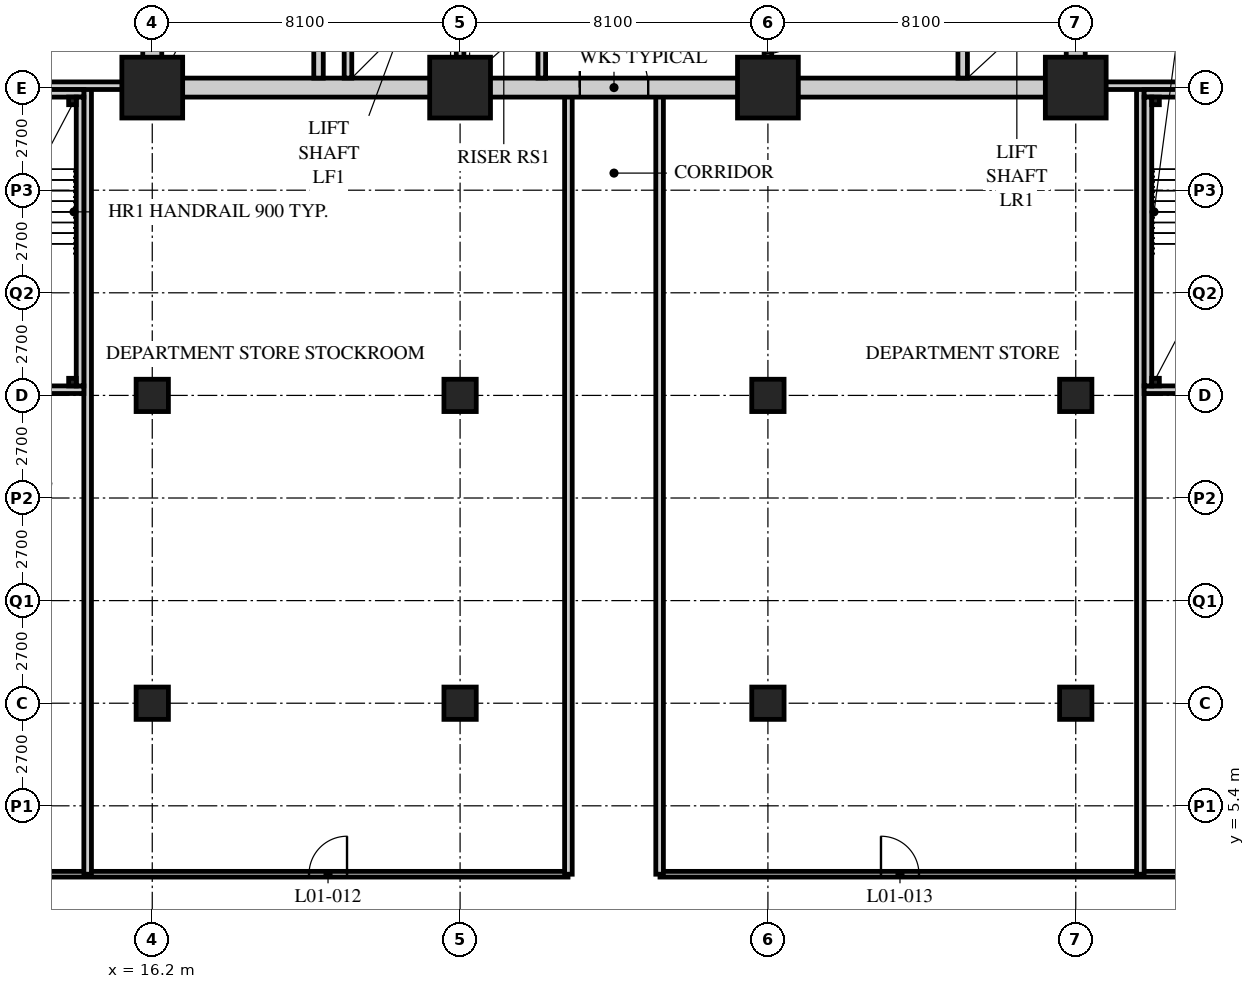
"""IFC4 building model, lengths in metres.
Left out: names, types, materials, properties, quantities, classifications, styles, units other than length and angle.
Written with IfcOpenShell. Run it as: python <this file> out.ifc"""

import sys

from ifc_helpers import new_model, si_unit, direction, frame, frame_2d, origin, origin_2d, place, context, subcontext, project, spatial, rectangle, hollow_rectangle, extrude, element, fill, save


model = new_model("IFC4")
c1 = context("Model", 3, precision=1e-05, world=origin(), true_north=direction((0.0, 1.0)))
c2 = subcontext(c1, "Body", "Model", "MODEL_VIEW")
j1 = project(units=[si_unit("LENGTHUNIT", "METRE"), si_unit("PLANEANGLEUNIT", "RADIAN")], contexts=[c1])
p1 = place(None, origin())
s1 = spatial("IfcSite", under=j1, at=p1, CompositionType="ELEMENT")
p2 = place(p1, origin())
s2 = spatial("IfcBuilding", under=s1, at=p2, CompositionType="ELEMENT")
p3 = place(p2, frame((0.0, 0.0, 6.0)))
s3 = spatial("IfcBuildingStorey", under=s2, at=p3, CompositionType="ELEMENT", Elevation=6.0)
for number, where, z_axis, x_axis in (
    (1, (16.2, 8.1, 0.0), (0.0, 0.0, 1.0), (1.0, 0.0, 0.0)),
    (2, (16.2, 16.2, 0.0), (0.0, 0.0, 1.0), (1.0, 0.0, 0.0)),
):
    element("IfcColumn", number, at=place(p3, frame(where, z_axis=z_axis, x_axis=x_axis)), inside=s3, PredefinedType="COLUMN", context=c2, shape_type="SweptSolid", body=[
        extrude(hollow_rectangle(XDim=0.85, YDim=0.85, WallThickness=0.085, at=origin_2d()), origin(), (0.0, 0.0, 1.0), 5.4),
    ])
p4 = place(p3, frame((16.2, 24.3, 0.0), z_axis=(0.0, 0.0, 1.0), x_axis=(1.0, 0.0, 0.0)))
e3 = element("IfcColumn", 3, at=p4, inside=s3, PredefinedType="COLUMN", context=c2, shape_type="SweptSolid", body=[
    extrude(hollow_rectangle(XDim=1.6, YDim=1.6, WallThickness=0.15, at=origin_2d()), origin(), (0.0, 0.0, 1.0), 5.4),
])
for number, where, z_axis, x_axis in (
    (4, (24.3, 8.1, 0.0), (0.0, 0.0, 1.0), (1.0, 0.0, 0.0)),
    (5, (24.3, 16.2, 0.0), (0.0, 0.0, 1.0), (1.0, 0.0, 0.0)),
):
    element("IfcColumn", number, at=place(p3, frame(where, z_axis=z_axis, x_axis=x_axis)), inside=s3, PredefinedType="COLUMN", context=c2, shape_type="SweptSolid", body=[
        extrude(hollow_rectangle(XDim=0.85, YDim=0.85, WallThickness=0.085, at=origin_2d()), origin(), (0.0, 0.0, 1.0), 5.4),
    ])
p5 = place(p3, frame((24.3, 24.3, 0.0), z_axis=(0.0, 0.0, 1.0), x_axis=(1.0, 0.0, 0.0)))
e6 = element("IfcColumn", 6, at=p5, inside=s3, PredefinedType="COLUMN", context=c2, shape_type="SweptSolid", body=[
    extrude(hollow_rectangle(XDim=1.6, YDim=1.6, WallThickness=0.15, at=origin_2d()), origin(), (0.0, 0.0, 1.0), 5.4),
])
for number, where, z_axis, x_axis in (
    (7, (32.4, 8.1, 0.0), (0.0, 0.0, 1.0), (1.0, 0.0, 0.0)),
    (8, (32.4, 16.2, 0.0), (0.0, 0.0, 1.0), (1.0, 0.0, 0.0)),
):
    element("IfcColumn", number, at=place(p3, frame(where, z_axis=z_axis, x_axis=x_axis)), inside=s3, PredefinedType="COLUMN", context=c2, shape_type="SweptSolid", body=[
        extrude(hollow_rectangle(XDim=0.85, YDim=0.85, WallThickness=0.085, at=origin_2d()), origin(), (0.0, 0.0, 1.0), 5.4),
    ])
p6 = place(p3, frame((32.4, 24.3, 0.0), z_axis=(0.0, 0.0, 1.0), x_axis=(1.0, 0.0, 0.0)))
e9 = element("IfcColumn", 9, at=p6, inside=s3, PredefinedType="COLUMN", context=c2, shape_type="SweptSolid", body=[
    extrude(hollow_rectangle(XDim=1.6, YDim=1.6, WallThickness=0.15, at=origin_2d()), origin(), (0.0, 0.0, 1.0), 5.4),
])
for number, where, z_axis, x_axis in (
    (10, (40.5, 8.1, 0.0), (0.0, 0.0, 1.0), (1.0, 0.0, 0.0)),
    (11, (40.5, 16.2, 0.0), (0.0, 0.0, 1.0), (1.0, 0.0, 0.0)),
):
    element("IfcColumn", number, at=place(p3, frame(where, z_axis=z_axis, x_axis=x_axis)), inside=s3, PredefinedType="COLUMN", context=c2, shape_type="SweptSolid", body=[
        extrude(hollow_rectangle(XDim=0.85, YDim=0.85, WallThickness=0.085, at=origin_2d()), origin(), (0.0, 0.0, 1.0), 5.4),
    ])
p7 = place(p3, frame((40.5, 24.3, 0.0), z_axis=(0.0, 0.0, 1.0), x_axis=(1.0, 0.0, 0.0)))
e12 = element("IfcColumn", 12, at=p7, inside=s3, PredefinedType="COLUMN", context=c2, shape_type="SweptSolid", body=[
    extrude(hollow_rectangle(XDim=1.6, YDim=1.6, WallThickness=0.15, at=origin_2d()), origin(), (0.0, 0.0, 1.0), 5.4),
])
p8 = place(p3, frame((3.6, 3.6, 0.0), z_axis=(0.0, 0.0, 1.0), x_axis=(1.0, 0.0, 0.0)))
e13 = element("IfcWall", 13, at=p8, inside=s3, PredefinedType="PARTITIONING", context=c2, shape_type="SweptSolid", body=[
    extrude(rectangle(XDim=23.54, YDim=0.15, at=frame_2d((11.77, 0.0))), origin(), (0.0, 0.0, 1.0), 5.15),
])
p9 = place(p8, frame((2.65, 0.0, 0.0)))
e14 = element("IfcOpeningElement", 14, at=p9, cuts=e13, PredefinedType="OPENING", context=c2, shape_type="SweptSolid", body=[
    extrude(rectangle(XDim=1.0, YDim=2.1, at=frame_2d((0.5, 1.05))), frame((0.0, 0.085, 0.0), z_axis=(0.0, -1.0, 0.0), x_axis=(1.0, 0.0, 0.0)), (0.0, 0.0, 1.0), 0.17),
])
p10 = place(p8, frame((16.725, 0.0, 0.0)))
e15 = element("IfcOpeningElement", 15, at=p10, cuts=e13, PredefinedType="OPENING", context=c2, shape_type="SweptSolid", body=[
    extrude(rectangle(XDim=1.0, YDim=2.1, at=frame_2d((0.5, 1.05))), frame((0.0, 0.085, 0.0), z_axis=(0.0, -1.0, 0.0), x_axis=(1.0, 0.0, 0.0)), (0.0, 0.0, 1.0), 0.17),
])
p11 = place(p3, frame((29.56, 3.6, 0.0), z_axis=(0.0, 0.0, 1.0), x_axis=(1.0, 0.0, 0.0)))
e16 = element("IfcWall", 16, at=p11, inside=s3, PredefinedType="PARTITIONING", context=c2, shape_type="SweptSolid", body=[
    extrude(rectangle(XDim=23.54, YDim=0.15, at=frame_2d((11.77, 0.0))), origin(), (0.0, 0.0, 1.0), 5.15),
])
p12 = place(p11, frame((5.815, 0.0, 0.0)))
e17 = element("IfcOpeningElement", 17, at=p12, cuts=e16, PredefinedType="OPENING", context=c2, shape_type="SweptSolid", body=[
    extrude(rectangle(XDim=1.0, YDim=2.1, at=frame_2d((0.5, 1.05))), frame((0.0, 0.085, 0.0), z_axis=(0.0, -1.0, 0.0), x_axis=(1.0, 0.0, 0.0)), (0.0, 0.0, 1.0), 0.17),
])
p13 = place(p11, frame((19.89, 0.0, 0.0)))
e18 = element("IfcOpeningElement", 18, at=p13, cuts=e16, PredefinedType="OPENING", context=c2, shape_type="SweptSolid", body=[
    extrude(rectangle(XDim=1.0, YDim=2.1, at=frame_2d((0.5, 1.05))), frame((0.0, 0.085, 0.0), z_axis=(0.0, -1.0, 0.0), x_axis=(1.0, 0.0, 0.0)), (0.0, 0.0, 1.0), 0.17),
])
for number, where, z_axis, x_axis in (
    (19, (14.5, 3.6, 0.0), (0.0, 0.0, 1.0), (0.0, 1.0, 0.0)),
    (20, (42.2, 3.6, 0.0), (0.0, 0.0, 1.0), (0.0, 1.0, 0.0)),
    (21, (27.15, 3.6, 0.0), (0.0, 0.0, 1.0), (0.0, 1.0, 0.0)),
    (22, (29.55, 3.6, 0.0), (0.0, 0.0, 1.0), (0.0, 1.0, 0.0)),
):
    element("IfcWall", number, at=place(p3, frame(where, z_axis=z_axis, x_axis=x_axis)), inside=s3, PredefinedType="SOLIDWALL", context=c2, shape_type="SweptSolid", body=[
        extrude(rectangle(XDim=20.7, YDim=0.2, at=frame_2d((10.35, 0.0))), origin(), (0.0, 0.0, 1.0), 5.15),
    ])
p14 = place(p3, frame((3.6, 24.35, 0.0), z_axis=(0.0, 0.0, 1.0), x_axis=(1.0, 0.0, 0.0)))
e23 = element("IfcWall", 23, at=p14, inside=s3, PredefinedType="SOLIDWALL", context=c2, shape_type="SweptSolid", body=[
    extrude(rectangle(XDim=12.6, YDim=0.2, at=frame_2d((6.3, 0.0))), origin(), (0.0, 0.0, 1.0), 4.538),
])
p15 = place(p3, frame((40.5, 24.35, 0.0), z_axis=(0.0, 0.0, 1.0), x_axis=(1.0, 0.0, 0.0)))
e24 = element("IfcWall", 24, at=p15, inside=s3, PredefinedType="SOLIDWALL", context=c2, shape_type="SweptSolid", body=[
    extrude(rectangle(XDim=12.6, YDim=0.2, at=frame_2d((6.3, 0.0))), origin(), (0.0, 0.0, 1.0), 4.538),
])
p16 = place(p3, frame((15.95, 24.3, 0.0), z_axis=(0.0, 0.0, 1.0), x_axis=(1.0, 0.0, 0.0)))
e25 = element("IfcWall", 25, at=p16, inside=s3, PredefinedType="SOLIDWALL", context=c2, shape_type="SweptSolid", body=[
    extrude(rectangle(XDim=24.8, YDim=0.5, at=frame_2d((12.4, 0.0))), origin(), (0.0, 0.0, 1.0), 4.5),
])
p17 = place(p16, frame((11.5, 0.0, 0.0)))
e26 = element("IfcOpeningElement", 26, at=p17, cuts=e25, PredefinedType="OPENING", context=c2, shape_type="SweptSolid", body=[
    extrude(rectangle(XDim=1.8, YDim=2.4, at=frame_2d((0.9, 1.2))), frame((0.0, 0.26, 0.0), z_axis=(0.0, -1.0, 0.0), x_axis=(1.0, 0.0, 0.0)), (0.0, 0.0, 1.0), 0.52),
])
for number, where, z_axis, x_axis in (
    (27, (16.2, 24.55, 0.0), (0.0, 0.0, 1.0), (0.0, 1.0, 0.0)),
    (28, (40.5, 24.55, 0.0), (0.0, 0.0, 1.0), (0.0, 1.0, 0.0)),
):
    element("IfcWall", number, at=place(p3, frame(where, z_axis=z_axis, x_axis=x_axis)), inside=s3, PredefinedType="SOLIDWALL", context=c2, shape_type="SweptSolid", body=[
        extrude(rectangle(XDim=15.7, YDim=0.5, at=frame_2d((7.85, 0.0))), origin(), (0.0, 0.0, 1.0), 4.538),
    ])
p18 = place(p3, frame((24.3, 24.55, 0.0), z_axis=(0.0, 0.0, 1.0), x_axis=(0.0, 1.0, 0.0)))
e29 = element("IfcWall", 29, at=p18, inside=s3, PredefinedType="SOLIDWALL", context=c2, shape_type="SweptSolid", body=[
    extrude(rectangle(XDim=7.75, YDim=0.2, at=frame_2d((3.875, 0.0))), origin(), (0.0, 0.0, 1.0), 4.45),
])
p19 = place(p18, frame((4.6, 0.0, 0.0)))
e30 = element("IfcOpeningElement", 30, at=p19, cuts=e29, PredefinedType="OPENING", context=c2, shape_type="SweptSolid", body=[
    extrude(rectangle(XDim=1.2, YDim=2.1, at=frame_2d((0.6, 1.05))), frame((0.0, 0.11, 0.0), z_axis=(0.0, -1.0, 0.0), x_axis=(1.0, 0.0, 0.0)), (0.0, 0.0, 1.0), 0.22),
])
p20 = place(p3, frame((20.575, 24.55, 0.0), z_axis=(0.0, 0.0, 1.0), x_axis=(0.0, 1.0, 0.0)))
e31 = element("IfcWall", 31, at=p20, inside=s3, PredefinedType="SOLIDWALL", context=c2, shape_type="SweptSolid", body=[
    extrude(rectangle(XDim=7.75, YDim=0.25, at=frame_2d((3.875, 0.0))), origin(), (0.0, 0.0, 1.0), 5.15),
])
p21 = place(p20, frame((6.2, 0.0, 0.0)))
e32 = element("IfcOpeningElement", 32, at=p21, cuts=e31, PredefinedType="OPENING", context=c2, shape_type="SweptSolid", body=[
    extrude(rectangle(XDim=1.2, YDim=2.1, at=frame_2d((0.6, 1.05))), frame((0.0, 0.135, 0.0), z_axis=(0.0, -1.0, 0.0), x_axis=(1.0, 0.0, 0.0)), (0.0, 0.0, 1.0), 0.27),
])
p22 = place(p3, frame((21.35, 24.55, 0.0), z_axis=(0.0, 0.0, 1.0), x_axis=(0.0, 1.0, 0.0)))
e33 = element("IfcWall", 33, at=p22, inside=s3, PredefinedType="SOLIDWALL", context=c2, shape_type="SweptSolid", body=[
    extrude(rectangle(XDim=2.6, YDim=0.2, at=frame_2d((1.3, 0.0))), origin(), (0.0, 0.0, 1.0), 5.15),
])
p23 = place(p3, frame((26.45, 24.55, 0.0), z_axis=(0.0, 0.0, 1.0), x_axis=(0.0, 1.0, 0.0)))
e34 = element("IfcWall", 34, at=p23, inside=s3, PredefinedType="SOLIDWALL", context=c2, shape_type="SweptSolid", body=[
    extrude(rectangle(XDim=1.6, YDim=0.2, at=frame_2d((0.8, 0.0))), origin(), (0.0, 0.0, 1.0), 5.15),
])
p24 = place(p3, frame((37.525, 24.55, 0.0), z_axis=(0.0, 0.0, 1.0), x_axis=(0.0, 1.0, 0.0)))
e35 = element("IfcWall", 35, at=p24, inside=s3, PredefinedType="SOLIDWALL", context=c2, shape_type="SweptSolid", body=[
    extrude(rectangle(XDim=7.75, YDim=0.25, at=frame_2d((3.875, 0.0))), origin(), (0.0, 0.0, 1.0), 5.15),
])
p25 = place(p3, frame((32.4, 24.55, 0.0), z_axis=(0.0, 0.0, 1.0), x_axis=(0.0, 1.0, 0.0)))
e36 = element("IfcWall", 36, at=p25, inside=s3, PredefinedType="PARTITIONING", context=c2, shape_type="SweptSolid", body=[
    extrude(rectangle(XDim=7.75, YDim=0.2, at=frame_2d((3.875, 0.0))), origin(), (0.0, 0.0, 1.0), 4.45),
])
p26 = place(p25, frame((0.65, 0.0, 0.0)))
e37 = element("IfcOpeningElement", 37, at=p26, cuts=e36, PredefinedType="OPENING", context=c2, shape_type="SweptSolid", body=[
    extrude(rectangle(XDim=0.9, YDim=2.1, at=frame_2d((0.45, 1.05))), frame((0.0, 0.11, 0.0), z_axis=(0.0, -1.0, 0.0), x_axis=(1.0, 0.0, 0.0)), (0.0, 0.0, 1.0), 0.22),
])
p27 = place(p25, frame((4.5, 0.0, 0.0)))
e38 = element("IfcOpeningElement", 38, at=p27, cuts=e36, PredefinedType="OPENING", context=c2, shape_type="SweptSolid", body=[
    extrude(rectangle(XDim=0.9, YDim=2.1, at=frame_2d((0.45, 1.05))), frame((0.0, 0.11, 0.0), z_axis=(0.0, -1.0, 0.0), x_axis=(1.0, 0.0, 0.0)), (0.0, 0.0, 1.0), 0.22),
])
p28 = place(p3, frame((10.0, 16.35, 0.0), z_axis=(0.0, 0.0, 1.0), x_axis=(1.0, 0.0, 0.0)))
e39 = element("IfcWall", 39, at=p28, inside=s3, PredefinedType="SOLIDWALL", context=c2, shape_type="SweptSolid", body=[
    extrude(rectangle(XDim=4.4, YDim=0.2, at=frame_2d((2.2, 0.0))), origin(), (0.0, 0.0, 1.0), 4.538),
])
p29 = place(p28, frame((1.6, 0.0, 0.0)))
e40 = element("IfcOpeningElement", 40, at=p29, cuts=e39, PredefinedType="OPENING", context=c2, shape_type="SweptSolid", body=[
    extrude(rectangle(XDim=1.2, YDim=2.1, at=frame_2d((0.6, 1.05))), frame((0.0, 0.11, 0.0), z_axis=(0.0, -1.0, 0.0), x_axis=(1.0, 0.0, 0.0)), (0.0, 0.0, 1.0), 0.22),
])
p30 = place(p3, frame((10.0, 24.15, 0.0), z_axis=(0.0, 0.0, 1.0), x_axis=(1.0, 0.0, 0.0)))
e41 = element("IfcWall", 41, at=p30, inside=s3, PredefinedType="SOLIDWALL", context=c2, shape_type="SweptSolid", body=[
    extrude(rectangle(XDim=4.4, YDim=0.2, at=frame_2d((2.2, 0.0))), origin(), (0.0, 0.0, 1.0), 4.538),
])
p31 = place(p3, frame((14.3, 16.45, 0.0), z_axis=(0.0, 0.0, 1.0), x_axis=(0.0, 1.0, 0.0)))
e42 = element("IfcWall", 42, at=p31, inside=s3, PredefinedType="SOLIDWALL", context=c2, shape_type="SweptSolid", body=[
    extrude(rectangle(XDim=7.6, YDim=0.2, at=frame_2d((3.8, 0.0))), origin(), (0.0, 0.0, 1.0), 5.15),
])
p32 = place(p3, frame((42.3, 16.35, 0.0), z_axis=(0.0, 0.0, 1.0), x_axis=(1.0, 0.0, 0.0)))
e43 = element("IfcWall", 43, at=p32, inside=s3, PredefinedType="SOLIDWALL", context=c2, shape_type="SweptSolid", body=[
    extrude(rectangle(XDim=4.4, YDim=0.2, at=frame_2d((2.2, 0.0))), origin(), (0.0, 0.0, 1.0), 4.538),
])
p33 = place(p32, frame((1.6, 0.0, 0.0)))
e44 = element("IfcOpeningElement", 44, at=p33, cuts=e43, PredefinedType="OPENING", context=c2, shape_type="SweptSolid", body=[
    extrude(rectangle(XDim=1.2, YDim=2.1, at=frame_2d((0.6, 1.05))), frame((0.0, 0.11, 0.0), z_axis=(0.0, -1.0, 0.0), x_axis=(1.0, 0.0, 0.0)), (0.0, 0.0, 1.0), 0.22),
])
p34 = place(p3, frame((42.3, 24.15, 0.0), z_axis=(0.0, 0.0, 1.0), x_axis=(1.0, 0.0, 0.0)))
e45 = element("IfcWall", 45, at=p34, inside=s3, PredefinedType="SOLIDWALL", context=c2, shape_type="SweptSolid", body=[
    extrude(rectangle(XDim=4.4, YDim=0.2, at=frame_2d((2.2, 0.0))), origin(), (0.0, 0.0, 1.0), 4.538),
])
p35 = place(p3, frame((42.4, 16.45, 0.0), z_axis=(0.0, 0.0, 1.0), x_axis=(0.0, 1.0, 0.0)))
e46 = element("IfcWall", 46, at=p35, inside=s3, PredefinedType="SOLIDWALL", context=c2, shape_type="SweptSolid", body=[
    extrude(rectangle(XDim=7.6, YDim=0.2, at=frame_2d((3.8, 0.0))), origin(), (0.0, 0.0, 1.0), 5.15),
])
for number, where, z_axis, x_axis in (
    (47, (14.1, 23.95, 0.0), (0.0, 0.0, 1.0), (1.0, 0.0, 0.0)),
    (48, (14.1, 16.55, 0.0), (0.0, 0.0, 1.0), (1.0, 0.0, 0.0)),
    (49, (42.6, 23.95, 0.0), (0.0, 0.0, 1.0), (1.0, 0.0, 0.0)),
    (50, (42.6, 16.55, 0.0), (0.0, 0.0, 1.0), (1.0, 0.0, 0.0)),
):
    element("IfcColumn", number, at=place(p3, frame(where, z_axis=z_axis, x_axis=x_axis)), inside=s3, PredefinedType="COLUMN", context=c2, shape_type="SweptSolid", body=[
        extrude(hollow_rectangle(XDim=0.2, YDim=0.2, WallThickness=0.012, at=origin_2d()), origin(), (0.0, 0.0, 1.0), 5.4),
    ])
p36 = place(p10, origin())
e51 = element("IfcDoor", 51, at=p36, inside=s3, OperationType="SINGLE_SWING_RIGHT", PredefinedType="DOOR", context=c2, shape_type="SweptSolid", body=[
    extrude(rectangle(XDim=1.0, YDim=2.1, at=frame_2d((0.5, 1.05))), frame((0.0, 0.025, 0.0), z_axis=(0.0, -1.0, 0.0), x_axis=(1.0, 0.0, 0.0)), (0.0, 0.0, 1.0), 0.05),
])
fill(e15, e51)
p37 = place(p12, origin())
e52 = element("IfcDoor", 52, at=p37, inside=s3, OperationType="SINGLE_SWING_LEFT", PredefinedType="DOOR", context=c2, shape_type="SweptSolid", body=[
    extrude(rectangle(XDim=1.0, YDim=2.1, at=frame_2d((0.5, 1.05))), frame((0.0, 0.025, 0.0), z_axis=(0.0, -1.0, 0.0), x_axis=(1.0, 0.0, 0.0)), (0.0, 0.0, 1.0), 0.05),
])
fill(e17, e52)
p38 = place(p26, origin())
e53 = element("IfcDoor", 53, at=p38, inside=s3, OperationType="SINGLE_SWING_LEFT", PredefinedType="DOOR", context=c2, shape_type="SweptSolid", body=[
    extrude(rectangle(XDim=0.9, YDim=2.1, at=frame_2d((0.45, 1.05))), frame((0.0, 0.025, 0.0), z_axis=(0.0, -1.0, 0.0), x_axis=(1.0, 0.0, 0.0)), (0.0, 0.0, 1.0), 0.05),
])
fill(e37, e53)
p39 = place(p17, origin())
e54 = element("IfcDoor", 54, at=p39, inside=s3, OperationType="DOUBLE_DOOR_SINGLE_SWING", PredefinedType="DOOR", context=c2, shape_type="SweptSolid", body=[
    extrude(rectangle(XDim=1.8, YDim=2.4, at=frame_2d((0.9, 1.2))), frame((0.0, 0.025, 0.0), z_axis=(0.0, -1.0, 0.0), x_axis=(1.0, 0.0, 0.0)), (0.0, 0.0, 1.0), 0.05),
])
fill(e26, e54)
save(model, sys.argv[1])
